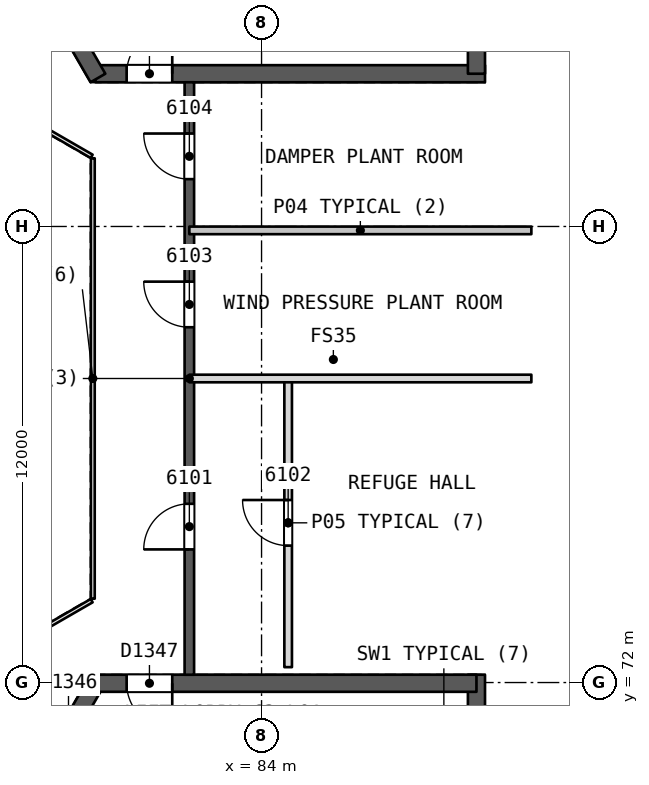
"""IFC4 building model, lengths in metres.
Left out: names, types, materials, properties, quantities, classifications, styles, units other than length and angle.
Written with IfcOpenShell. Run it as: python <this file> out.ifc"""

import sys

from ifc_helpers import new_model, si_unit, direction, frame, frame_2d, origin, place, context, subcontext, project, spatial, rectangle, extrude, element, fill, save


model = new_model("IFC4")
c1 = context("Model", 3, precision=1e-05, world=origin(), true_north=direction((0.0, 1.0)))
c2 = subcontext(c1, "Body", "Model", "MODEL_VIEW")
j1 = project(units=[si_unit("LENGTHUNIT", "METRE"), si_unit("PLANEANGLEUNIT", "RADIAN")], contexts=[c1])
p1 = place(None, origin())
s1 = spatial("IfcSite", under=j1, at=p1, CompositionType="ELEMENT")
p2 = place(p1, origin())
s2 = spatial("IfcBuilding", under=s1, at=p2, CompositionType="ELEMENT")
p3 = place(p2, frame((0.0, 0.0, 246.5)))
s3 = spatial("IfcBuildingStorey", under=s2, at=p3, CompositionType="ELEMENT", Elevation=246.5)
p4 = place(p3, frame((79.63, 88.019, 0.0), z_axis=(0.0, 0.0, 1.0), x_axis=(1.0, 0.0, 0.0)))
e1 = element("IfcWall", 1, at=p4, inside=s3, PredefinedType="SHEAR", context=c2, shape_type="SweptSolid", body=[
    extrude(rectangle(XDim=10.25, YDim=0.45, at=frame_2d((5.125, 0.0))), origin(), (0.0, 0.0, 1.0), 8.8),
])
p5 = place(p4, frame((0.82, 0.0, 0.0)))
e2 = element("IfcOpeningElement", 2, at=p5, cuts=e1, PredefinedType="OPENING", context=c2, shape_type="SweptSolid", body=[
    extrude(rectangle(XDim=1.2, YDim=2.1, at=frame_2d((0.6, 1.05))), frame((0.0, 0.235, 0.0), z_axis=(0.0, -1.0, 0.0), x_axis=(1.0, 0.0, 0.0)), (0.0, 0.0, 1.0), 0.471),
])
p6 = place(p3, frame((89.655, 88.019, 0.0), z_axis=(0.0, 0.0, 1.0), x_axis=(0.0, 1.0, 0.0)))
e3 = element("IfcWall", 3, at=p6, inside=s3, PredefinedType="SHEAR", context=c2, shape_type="SweptSolid", body=[
    extrude(rectangle(XDim=14.108, YDim=0.45, at=frame_2d((7.054, 0.0))), origin(), (0.0, 0.0, 1.0), 8.8),
])
p7 = place(p3, frame((74.617, 96.701, 0.0), z_axis=(0.0, 0.0, 1.0), x_axis=(0.499994385119, -0.866028645513, 0.0)))
e4 = element("IfcWall", 4, at=p7, inside=s3, PredefinedType="SHEAR", context=c2, shape_type="SweptSolid", body=[
    extrude(rectangle(XDim=10.155, YDim=0.45, at=frame_2d((5.077, 0.0))), origin(), (0.0, 0.0, 1.0), 8.8),
])
p8 = place(p7, frame((8.005, 0.0, 0.0)))
e5 = element("IfcOpeningElement", 5, at=p8, cuts=e4, PredefinedType="OPENING", context=c2, shape_type="SweptSolid", body=[
    extrude(rectangle(XDim=1.2, YDim=2.1, at=frame_2d((0.6, 1.05))), frame((0.0, 0.235, 0.0), z_axis=(0.0, -1.0, 0.0), x_axis=(1.0, 0.0, 0.0)), (0.0, 0.0, 1.0), 0.471),
])
p9 = place(p3, frame((79.63, 71.981, 0.0), z_axis=(0.0, 0.0, 1.0), x_axis=(-0.500002171595, -0.86602415001, 0.0)))
e6 = element("IfcWall", 6, at=p9, inside=s3, PredefinedType="SHEAR", context=c2, shape_type="SweptSolid", body=[
    extrude(rectangle(XDim=10.25, YDim=0.45, at=frame_2d((5.125, 0.0))), origin(), (0.0, 0.0, 1.0), 8.8),
])
p10 = place(p9, frame((0.82, 0.0, 0.0)))
e7 = element("IfcOpeningElement", 7, at=p10, cuts=e6, PredefinedType="OPENING", context=c2, shape_type="SweptSolid", body=[
    extrude(rectangle(XDim=1.2, YDim=2.1, at=frame_2d((0.6, 1.05))), frame((0.0, 0.235, 0.0), z_axis=(0.0, -1.0, 0.0), x_axis=(1.0, 0.0, 0.0)), (0.0, 0.0, 1.0), 0.471),
])
p11 = place(p3, frame((89.655, 58.002, 0.0), z_axis=(0.0, 0.0, 1.0), x_axis=(0.0, 1.0, 0.0)))
e8 = element("IfcWall", 8, at=p11, inside=s3, PredefinedType="SHEAR", context=c2, shape_type="SweptSolid", body=[
    extrude(rectangle(XDim=14.204, YDim=0.45, at=frame_2d((7.102, 0.0))), origin(), (0.0, 0.0, 1.0), 8.8),
])
p12 = place(p3, frame((89.655, 71.981, 0.0), z_axis=(0.0, 0.0, 1.0), x_axis=(-1.0, 0.0, 0.0)))
e9 = element("IfcWall", 9, at=p12, inside=s3, PredefinedType="SHEAR", context=c2, shape_type="SweptSolid", body=[
    extrude(rectangle(XDim=10.155, YDim=0.45, at=frame_2d((5.078, 0.0))), origin(), (0.0, 0.0, 1.0), 8.8),
])
p13 = place(p12, frame((8.005, 0.0, 0.0)))
e10 = element("IfcOpeningElement", 10, at=p13, cuts=e9, PredefinedType="OPENING", context=c2, shape_type="SweptSolid", body=[
    extrude(rectangle(XDim=1.2, YDim=2.1, at=frame_2d((0.6, 1.05))), frame((0.0, 0.235, 0.0), z_axis=(0.0, -1.0, 0.0), x_axis=(1.0, 0.0, 0.0)), (0.0, 0.0, 1.0), 0.471),
])
p14 = place(p3, frame((82.1, 72.206, 0.0), z_axis=(0.0, 0.0, 1.0), x_axis=(0.0, 1.0, 0.0)))
e11 = element("IfcWall", 11, at=p14, inside=s3, PredefinedType="SHEAR", context=c2, shape_type="SweptSolid", body=[
    extrude(rectangle(XDim=15.588, YDim=0.25, at=frame_2d((7.794, 0.0))), origin(), (0.0, 0.0, 1.0), 8.4),
])
p15 = place(p14, frame((3.297, 0.0, 0.0)))
e12 = element("IfcOpeningElement", 12, at=p15, cuts=e11, PredefinedType="OPENING", context=c2, shape_type="SweptSolid", body=[
    extrude(rectangle(XDim=1.2, YDim=2.4, at=frame_2d((0.6, 1.2))), frame((0.0, 0.135, 0.0), z_axis=(0.0, -1.0, 0.0), x_axis=(1.0, 0.0, 0.0)), (0.0, 0.0, 1.0), 0.271),
])
p16 = place(p14, frame((9.143, 0.0, 0.0)))
e13 = element("IfcOpeningElement", 13, at=p16, cuts=e11, PredefinedType="OPENING", context=c2, shape_type="SweptSolid", body=[
    extrude(rectangle(XDim=1.2, YDim=2.4, at=frame_2d((0.6, 1.2))), frame((0.0, 0.135, 0.0), z_axis=(0.0, -1.0, 0.0), x_axis=(1.0, 0.0, 0.0)), (0.0, 0.0, 1.0), 0.271),
])
p17 = place(p14, frame((13.04, 0.0, 0.0)))
e14 = element("IfcOpeningElement", 14, at=p17, cuts=e11, PredefinedType="OPENING", context=c2, shape_type="SweptSolid", body=[
    extrude(rectangle(XDim=1.2, YDim=2.4, at=frame_2d((0.6, 1.2))), frame((0.0, 0.135, 0.0), z_axis=(0.0, -1.0, 0.0), x_axis=(1.0, 0.0, 0.0)), (0.0, 0.0, 1.0), 0.271),
])
p18 = place(p3, frame((84.7, 72.405, 0.0), z_axis=(0.0, 0.0, 1.0), x_axis=(0.0, 1.0, 0.0)))
e15 = element("IfcWall", 15, at=p18, inside=s3, PredefinedType="PARTITIONING", context=c2, shape_type="SweptSolid", body=[
    extrude(rectangle(XDim=7.595, YDim=0.2, at=frame_2d((3.798, 0.0))), origin(), (0.0, 0.0, 1.0), 8.4),
])
p19 = place(p18, frame((3.198, 0.0, 0.0)))
e16 = element("IfcOpeningElement", 16, at=p19, cuts=e15, PredefinedType="OPENING", context=c2, shape_type="SweptSolid", body=[
    extrude(rectangle(XDim=1.2, YDim=2.4, at=frame_2d((0.6, 1.2))), frame((0.0, 0.11, 0.0), z_axis=(0.0, -1.0, 0.0), x_axis=(1.0, 0.0, 0.0)), (0.0, 0.0, 1.0), 0.221),
])
for number, where, z_axis, x_axis in (
    (17, (91.1, 80.0, 0.0), (0.0, 0.0, 1.0), (-1.0, 0.0, 0.0)),
    (18, (91.1, 83.897, 0.0), (0.0, 0.0, 1.0), (-1.0, 0.0, 0.0)),
):
    element("IfcWall", number, at=place(p3, frame(where, z_axis=z_axis, x_axis=x_axis)), inside=s3, PredefinedType="PARTITIONING", context=c2, shape_type="SweptSolid", body=[
        extrude(rectangle(XDim=9.0, YDim=0.2, at=frame_2d((4.5, 0.0))), origin(), (0.0, 0.0, 1.0), 8.4),
    ])
p20 = place(p3, frame((79.56, 74.206, 0.0), z_axis=(0.0, 0.0, 1.0), x_axis=(0.0, 1.0, 0.0)))
e19 = element("IfcWall", 19, at=p20, inside=s3, PredefinedType="PARTITIONING", context=c2, shape_type="SweptSolid", body=[
    extrude(rectangle(XDim=11.588, YDim=0.1, at=frame_2d((5.794, 0.0))), origin(), (0.0, 0.0, 1.0), 8.4),
])
for number, where, z_axis, x_axis in (
    (20, (79.53, 85.846, 0.0), (0.0, 0.0, 1.0), (-0.866, 0.5, 0.0)),
    (21, (77.798, 73.154, 0.0), (0.0, 0.0, 1.0), (0.866, 0.5, 0.0)),
):
    element("IfcWall", number, at=place(p3, frame(where, z_axis=z_axis, x_axis=x_axis)), inside=s3, PredefinedType="PARTITIONING", context=c2, shape_type="SweptSolid", body=[
        extrude(rectangle(XDim=2.0, YDim=0.1, at=frame_2d((1.0, 0.0))), origin(), (0.0, 0.0, 1.0), 8.4),
    ])
p21 = place(p15, origin())
e22 = element("IfcDoor", 22, at=p21, inside=s3, OperationType="SINGLE_SWING_LEFT", PredefinedType="NOTDEFINED", context=c2, shape_type="SweptSolid", body=[
    extrude(rectangle(XDim=1.2, YDim=2.4, at=frame_2d((0.6, 1.2))), frame((0.0, 0.025, 0.0), z_axis=(0.0, -1.0, 0.0), x_axis=(1.0, 0.0, 0.0)), (0.0, 0.0, 1.0), 0.05),
])
fill(e12, e22)
p22 = place(p19, origin())
e23 = element("IfcDoor", 23, at=p22, inside=s3, OperationType="SINGLE_SWING_RIGHT", PredefinedType="NOTDEFINED", context=c2, shape_type="SweptSolid", body=[
    extrude(rectangle(XDim=1.2, YDim=2.4, at=frame_2d((0.6, 1.2))), frame((0.0, 0.025, 0.0), z_axis=(0.0, -1.0, 0.0), x_axis=(1.0, 0.0, 0.0)), (0.0, 0.0, 1.0), 0.05),
])
fill(e16, e23)
p23 = place(p16, origin())
e24 = element("IfcDoor", 24, at=p23, inside=s3, OperationType="SINGLE_SWING_RIGHT", PredefinedType="NOTDEFINED", context=c2, shape_type="SweptSolid", body=[
    extrude(rectangle(XDim=1.2, YDim=2.4, at=frame_2d((0.6, 1.2))), frame((0.0, 0.025, 0.0), z_axis=(0.0, -1.0, 0.0), x_axis=(1.0, 0.0, 0.0)), (0.0, 0.0, 1.0), 0.05),
])
fill(e13, e24)
p24 = place(p17, origin())
e25 = element("IfcDoor", 25, at=p24, inside=s3, OperationType="SINGLE_SWING_RIGHT", PredefinedType="NOTDEFINED", context=c2, shape_type="SweptSolid", body=[
    extrude(rectangle(XDim=1.2, YDim=2.4, at=frame_2d((0.6, 1.2))), frame((0.0, 0.025, 0.0), z_axis=(0.0, -1.0, 0.0), x_axis=(1.0, 0.0, 0.0)), (0.0, 0.0, 1.0), 0.05),
])
fill(e14, e25)
p25 = place(p5, origin())
e26 = element("IfcDoor", 26, at=p25, inside=s3, OperationType="SINGLE_SWING_RIGHT", PredefinedType="NOTDEFINED", context=c2, shape_type="SweptSolid", body=[
    extrude(rectangle(XDim=1.2, YDim=2.1, at=frame_2d((0.6, 1.05))), frame((0.0, 0.025, 0.0), z_axis=(0.0, -1.0, 0.0), x_axis=(1.0, 0.0, 0.0)), (0.0, 0.0, 1.0), 0.05),
])
fill(e2, e26)
p26 = place(p13, origin())
e27 = element("IfcDoor", 27, at=p26, inside=s3, OperationType="SINGLE_SWING_LEFT", PredefinedType="NOTDEFINED", context=c2, shape_type="SweptSolid", body=[
    extrude(rectangle(XDim=1.2, YDim=2.1, at=frame_2d((0.6, 1.05))), frame((0.0, 0.025, 0.0), z_axis=(0.0, -1.0, 0.0), x_axis=(1.0, 0.0, 0.0)), (0.0, 0.0, 1.0), 0.05),
])
fill(e10, e27)
save(model, sys.argv[1])
